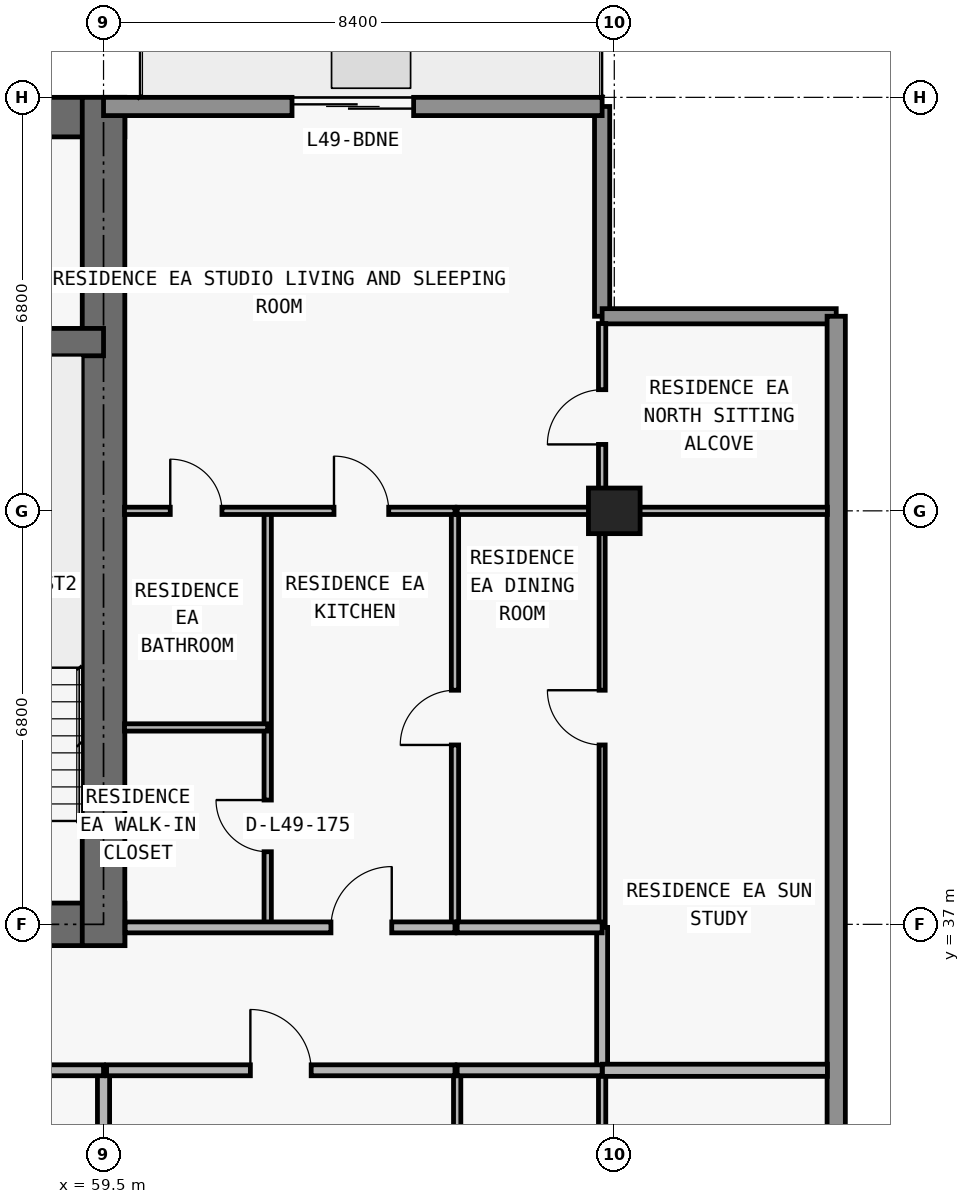
"""IFC4 building model, lengths in metres.
Left out: names, types, materials, properties, quantities, classifications, styles, units other than length and angle.
Written with IfcOpenShell. Run it as: python <this file> out.ifc"""

import sys

from ifc_helpers import new_model, si_unit, direction, frame, frame_2d, origin, origin_2d, place, context, subcontext, project, spatial, rectangle, extrude, element, fill, save


model = new_model("IFC4")
c1 = context("Model", 3, precision=1e-05, world=origin(), true_north=direction((0.0, 1.0)))
c2 = subcontext(c1, "Body", "Model", "MODEL_VIEW")
j1 = project(units=[si_unit("LENGTHUNIT", "METRE"), si_unit("PLANEANGLEUNIT", "RADIAN")], contexts=[c1])
p1 = place(None, origin())
s1 = spatial("IfcSite", under=j1, at=p1, CompositionType="ELEMENT")
p2 = place(p1, origin())
s2 = spatial("IfcBuilding", under=s1, at=p2, CompositionType="ELEMENT")
p3 = place(p2, frame((0.0, 0.0, 177.0)))
s3 = spatial("IfcBuildingStorey", under=s2, at=p3, CompositionType="ELEMENT", Elevation=177.0)
p4 = place(p3, frame((67.9, 43.8, 0.0), z_axis=(0.0, 0.0, 1.0), x_axis=(1.0, 0.0, 0.0)))
e1 = element("IfcColumn", 1, at=p4, inside=s3, PredefinedType="COLUMN", context=c2, shape_type="SweptSolid", body=[
    extrude(rectangle(XDim=0.85, YDim=0.75, at=origin_2d()), origin(), (0.0, 0.0, 1.0), 3.05),
])
p5 = place(p3, frame((17.95, 37.0, 0.0), z_axis=(0.0, 0.0, 1.0), x_axis=(1.0, 0.0, 0.0)))
e2 = element("IfcWall", 2, at=p5, inside=s3, PredefinedType="SHEAR", context=c2, shape_type="SweptSolid", body=[
    extrude(rectangle(XDim=41.9, YDim=0.7, at=frame_2d((20.95, 0.0))), origin(), (0.0, 0.0, 1.0), 3.05),
])
p6 = place(p5, frame((14.35, 0.0, 0.0)))
e3 = element("IfcOpeningElement", 3, at=p6, cuts=e2, PredefinedType="OPENING", context=c2, shape_type="SweptSolid", body=[
    extrude(rectangle(XDim=1.1, YDim=2.15, at=frame_2d((0.55, 1.075))), frame((0.0, 0.36, 0.0), z_axis=(0.0, -1.0, 0.0), x_axis=(1.0, 0.0, 0.0)), (0.0, 0.0, 1.0), 0.72),
])
p7 = place(p5, frame((6.2, 0.0, 0.0)))
e4 = element("IfcOpeningElement", 4, at=p7, cuts=e2, PredefinedType="OPENING", context=c2, shape_type="SweptSolid", body=[
    extrude(rectangle(XDim=1.05, YDim=2.15, at=frame_2d((0.525, 1.075))), frame((0.0, 0.36, 0.0), z_axis=(0.0, -1.0, 0.0), x_axis=(1.0, 0.0, 0.0)), (0.0, 0.0, 1.0), 0.72),
])
p8 = place(p5, frame((34.7, 0.0, 0.0)))
e5 = element("IfcOpeningElement", 5, at=p8, cuts=e2, PredefinedType="OPENING", context=c2, shape_type="SweptSolid", body=[
    extrude(rectangle(XDim=1.05, YDim=2.15, at=frame_2d((0.525, 1.075))), frame((0.0, 0.36, 0.0), z_axis=(0.0, -1.0, 0.0), x_axis=(1.0, 0.0, 0.0)), (0.0, 0.0, 1.0), 0.72),
])
p9 = place(p5, frame((10.812, 0.0, 0.0)))
e6 = element("IfcOpeningElement", 6, at=p9, cuts=e2, PredefinedType="OPENING", context=c2, shape_type="SweptSolid", body=[
    extrude(rectangle(XDim=1.05, YDim=2.15, at=frame_2d((0.525, 1.075))), frame((0.0, 0.36, 0.0), z_axis=(0.0, -1.0, 0.0), x_axis=(1.0, 0.0, 0.0)), (0.0, 0.0, 1.0), 0.72),
])
p10 = place(p5, frame((24.05, 0.0, 0.0)))
e7 = element("IfcOpeningElement", 7, at=p10, cuts=e2, PredefinedType="OPENING", context=c2, shape_type="SweptSolid", body=[
    extrude(rectangle(XDim=1.05, YDim=2.15, at=frame_2d((0.525, 1.075))), frame((0.0, 0.36, 0.0), z_axis=(0.0, -1.0, 0.0), x_axis=(1.0, 0.0, 0.0)), (0.0, 0.0, 1.0), 0.72),
])
p11 = place(p3, frame((17.95, 50.275, 0.0), z_axis=(0.0, 0.0, 1.0), x_axis=(1.0, 0.0, 0.0)))
e8 = element("IfcWall", 8, at=p11, inside=s3, PredefinedType="SHEAR", context=c2, shape_type="SweptSolid", body=[
    extrude(rectangle(XDim=41.9, YDim=0.65, at=frame_2d((20.95, 0.0))), origin(), (0.0, 0.0, 1.0), 3.05),
])
p12 = place(p3, frame((59.5, 36.65, 0.0), z_axis=(0.0, 0.0, 1.0), x_axis=(0.0, 1.0, 0.0)))
e9 = element("IfcWall", 9, at=p12, inside=s3, PredefinedType="SHEAR", context=c2, shape_type="SweptSolid", body=[
    extrude(rectangle(XDim=13.95, YDim=0.7, at=frame_2d((6.975, 0.0))), origin(), (0.0, 0.0, 1.0), 3.05),
])
p13 = place(p3, frame((18.3, 46.575, 0.0), z_axis=(0.0, 0.0, 1.0), x_axis=(1.0, 0.0, 0.0)))
e10 = element("IfcWall", 10, at=p13, inside=s3, PredefinedType="SHEAR", context=c2, shape_type="SweptSolid", body=[
    extrude(rectangle(XDim=41.2, YDim=0.45, at=frame_2d((20.6, 0.0))), origin(), (0.0, 0.0, 1.0), 3.05),
])
p14 = place(p13, frame((7.575, 0.0, 0.0)))
e11 = element("IfcOpeningElement", 11, at=p14, cuts=e10, PredefinedType="OPENING", context=c2, shape_type="SweptSolid", body=[
    extrude(rectangle(XDim=1.05, YDim=2.15, at=frame_2d((0.525, 1.075))), frame((0.0, 0.235, 0.0), z_axis=(0.0, -1.0, 0.0), x_axis=(1.0, 0.0, 0.0)), (0.0, 0.0, 1.0), 0.47),
])
p15 = place(p13, frame((32.625, 0.0, 0.0)))
e12 = element("IfcOpeningElement", 12, at=p15, cuts=e10, PredefinedType="OPENING", context=c2, shape_type="SweptSolid", body=[
    extrude(rectangle(XDim=1.05, YDim=2.15, at=frame_2d((0.525, 1.075))), frame((0.0, 0.235, 0.0), z_axis=(0.0, -1.0, 0.0), x_axis=(1.0, 0.0, 0.0)), (0.0, 0.0, 1.0), 0.47),
])
p16 = place(p3, frame((67.7, 50.45, 0.0), z_axis=(0.0, 0.0, 1.0), x_axis=(0.0, -1.0, 0.0)))
e13 = element("IfcWall", 13, at=p16, inside=s3, PredefinedType="ELEMENTEDWALL", context=c2, shape_type="SweptSolid", body=[
    extrude(rectangle(XDim=3.45, YDim=0.25, at=frame_2d((1.725, 0.0))), origin(), (0.0, 0.0, 1.0), 3.05),
])
p17 = place(p3, frame((67.7, 47.0, 0.0), z_axis=(0.0, 0.0, 1.0), x_axis=(1.0, 0.0, 0.0)))
e14 = element("IfcWall", 14, at=p17, inside=s3, PredefinedType="ELEMENTEDWALL", context=c2, shape_type="SweptSolid", body=[
    extrude(rectangle(XDim=3.85, YDim=0.25, at=frame_2d((1.925, 0.0))), origin(), (0.0, 0.0, 1.0), 3.05),
])
p18 = place(p3, frame((71.55, 47.0, 0.0), z_axis=(0.0, 0.0, 1.0), x_axis=(0.0, -1.0, 0.0)))
e15 = element("IfcWall", 15, at=p18, inside=s3, PredefinedType="STANDARD", context=c2, shape_type="SweptSolid", body=[
    extrude(rectangle(XDim=17.9, YDim=0.3, at=frame_2d((8.95, 0.0))), origin(), (0.0, 0.0, 1.0), 3.05),
])
p19 = place(p3, frame((59.5, 50.45, 0.0), z_axis=(0.0, 0.0, 1.0), x_axis=(1.0, 0.0, 0.0)))
e16 = element("IfcWall", 16, at=p19, inside=s3, PredefinedType="STANDARD", context=c2, shape_type="SweptSolid", body=[
    extrude(rectangle(XDim=8.2, YDim=0.3, at=frame_2d((4.1, 0.0))), origin(), (0.0, 0.0, 1.0), 3.05),
])
p20 = place(p19, frame((3.1, 0.0, 0.0)))
e17 = element("IfcOpeningElement", 17, at=p20, cuts=e16, PredefinedType="OPENING", context=c2, shape_type="SweptSolid", body=[
    extrude(rectangle(XDim=2.0, YDim=2.3, at=frame_2d((1.0, 1.15))), frame((0.0, 0.16, 0.0), z_axis=(0.0, -1.0, 0.0), x_axis=(1.0, 0.0, 0.0)), (0.0, 0.0, 1.0), 0.32),
])
p21 = place(p3, frame((59.5, 30.34, 0.0), z_axis=(0.0, 0.0, 1.0), x_axis=(0.0, 1.0, 0.0)))
e18 = element("IfcWall", 18, at=p21, inside=s3, PredefinedType="PARTITIONING", context=c2, shape_type="SweptSolid", body=[
    extrude(rectangle(XDim=4.26, YDim=0.2, at=frame_2d((2.13, 0.0))), origin(), (0.0, 0.0, 1.0), 2.263),
])
p22 = place(p3, frame((62.2, 37.0, 0.0), z_axis=(0.0, 0.0, 1.0), x_axis=(0.0, 1.0, 0.0)))
e19 = element("IfcWall", 19, at=p22, inside=s3, PredefinedType="PARTITIONING", context=c2, shape_type="SweptSolid", body=[
    extrude(rectangle(XDim=6.8, YDim=0.12, at=frame_2d((3.4, 0.0))), origin(), (0.0, 0.0, 1.0), 3.05),
])
p23 = place(p22, frame((1.194, 0.0, 0.0)))
e20 = element("IfcOpeningElement", 20, at=p23, cuts=e19, PredefinedType="OPENING", context=c2, shape_type="SweptSolid", body=[
    extrude(rectangle(XDim=0.85, YDim=2.1, at=frame_2d((0.425, 1.05))), frame((0.0, 0.07, 0.0), z_axis=(0.0, -1.0, 0.0), x_axis=(1.0, 0.0, 0.0)), (0.0, 0.0, 1.0), 0.14),
])
p24 = place(p3, frame((65.28, 37.0, 0.0), z_axis=(0.0, 0.0, 1.0), x_axis=(0.0, 1.0, 0.0)))
e21 = element("IfcWall", 21, at=p24, inside=s3, PredefinedType="PARTITIONING", context=c2, shape_type="SweptSolid", body=[
    extrude(rectangle(XDim=6.8, YDim=0.12, at=frame_2d((3.4, 0.0))), origin(), (0.0, 0.0, 1.0), 3.05),
])
p25 = place(p24, frame((2.95, 0.0, 0.0)))
e22 = element("IfcOpeningElement", 22, at=p25, cuts=e21, PredefinedType="OPENING", context=c2, shape_type="SweptSolid", body=[
    extrude(rectangle(XDim=0.9, YDim=2.15, at=frame_2d((0.45, 1.075))), frame((0.0, 0.07, 0.0), z_axis=(0.0, -1.0, 0.0), x_axis=(1.0, 0.0, 0.0)), (0.0, 0.0, 1.0), 0.14),
])
p26 = place(p3, frame((65.316, 30.34, 0.0), z_axis=(0.0, 0.0, 1.0), x_axis=(0.0, 1.0, 0.0)))
e23 = element("IfcWall", 23, at=p26, inside=s3, PredefinedType="PARTITIONING", context=c2, shape_type="SweptSolid", body=[
    extrude(rectangle(XDim=4.26, YDim=0.12, at=frame_2d((2.13, 0.0))), origin(), (0.0, 0.0, 1.0), 3.05),
])
p27 = place(p26, frame((1.705, 0.0, 0.0)))
e24 = element("IfcOpeningElement", 24, at=p27, cuts=e23, PredefinedType="OPENING", context=c2, shape_type="SweptSolid", body=[
    extrude(rectangle(XDim=0.85, YDim=2.1, at=frame_2d((0.425, 1.05))), frame((0.0, 0.07, 0.0), z_axis=(0.0, -1.0, 0.0), x_axis=(1.0, 0.0, 0.0)), (0.0, 0.0, 1.0), 0.14),
])
p28 = place(p3, frame((67.7, 30.34, 0.0), z_axis=(0.0, 0.0, 1.0), x_axis=(0.0, 1.0, 0.0)))
e25 = element("IfcWall", 25, at=p28, inside=s3, PredefinedType="PARTITIONING", context=c2, shape_type="SweptSolid", body=[
    extrude(rectangle(XDim=4.26, YDim=0.12, at=frame_2d((2.13, 0.0))), origin(), (0.0, 0.0, 1.0), 2.263),
])
p29 = place(p3, frame((67.7, 34.605, 0.0), z_axis=(0.0, 0.0, 1.0), x_axis=(0.0, 1.0, 0.0)))
e26 = element("IfcWall", 26, at=p29, inside=s3, PredefinedType="PARTITIONING", context=c2, shape_type="SweptSolid", body=[
    extrude(rectangle(XDim=2.345, YDim=0.18, at=frame_2d((1.172, 0.0))), origin(), (0.0, 0.0, 1.0), 2.263),
])
p30 = place(p3, frame((67.7, 37.0, 0.0), z_axis=(0.0, 0.0, 1.0), x_axis=(0.0, 1.0, 0.0)))
e27 = element("IfcWall", 27, at=p30, inside=s3, PredefinedType="MOVABLE", context=c2, shape_type="SweptSolid", body=[
    extrude(rectangle(XDim=6.8, YDim=0.1, at=frame_2d((3.4, 0.0))), origin(), (0.0, 0.0, 1.0), 2.263),
])
p31 = place(p30, frame((2.95, 0.0, 0.0)))
e28 = element("IfcOpeningElement", 28, at=p31, cuts=e27, PredefinedType="OPENING", context=c2, shape_type="SweptSolid", body=[
    extrude(rectangle(XDim=0.9, YDim=2.15, at=frame_2d((0.45, 1.075))), frame((0.0, 0.06, 0.0), z_axis=(0.0, -1.0, 0.0), x_axis=(1.0, 0.0, 0.0)), (0.0, 0.0, 1.0), 0.12),
])
p32 = place(p3, frame((67.7, 43.805, 0.0), z_axis=(0.0, 0.0, 1.0), x_axis=(0.0, 1.0, 0.0)))
e29 = element("IfcWall", 29, at=p32, inside=s3, PredefinedType="PARTITIONING", context=c2, shape_type="SweptSolid", body=[
    extrude(rectangle(XDim=3.075, YDim=0.12, at=frame_2d((1.538, 0.0))), origin(), (0.0, 0.0, 1.0), 3.05),
])
p33 = place(p32, frame((1.087, 0.0, 0.0)))
e30 = element("IfcOpeningElement", 30, at=p33, cuts=e29, PredefinedType="OPENING", context=c2, shape_type="SweptSolid", body=[
    extrude(rectangle(XDim=0.9, YDim=2.15, at=frame_2d((0.45, 1.075))), frame((0.0, 0.07, 0.0), z_axis=(0.0, -1.0, 0.0), x_axis=(1.0, 0.0, 0.0)), (0.0, 0.0, 1.0), 0.14),
])
p34 = place(p3, frame((18.3, 34.6, 0.0), z_axis=(0.0, 0.0, 1.0), x_axis=(1.0, 0.0, 0.0)))
e31 = element("IfcWall", 31, at=p34, inside=s3, PredefinedType="PARTITIONING", context=c2, shape_type="SweptSolid", body=[
    extrude(rectangle(XDim=41.2, YDim=0.18, at=frame_2d((20.6, 0.0))), origin(), (0.0, 0.0, 1.0), 3.05),
])
p35 = place(p34, frame((2.67, 0.0, 0.0)))
e32 = element("IfcOpeningElement", 32, at=p35, cuts=e31, PredefinedType="OPENING", context=c2, shape_type="SweptSolid", body=[
    extrude(rectangle(XDim=1.0, YDim=2.2, at=frame_2d((0.5, 1.1))), frame((0.0, 0.1, 0.0), z_axis=(0.0, -1.0, 0.0), x_axis=(1.0, 0.0, 0.0)), (0.0, 0.0, 1.0), 0.2),
])
p36 = place(p34, frame((11.212, 0.0, 0.0)))
e33 = element("IfcOpeningElement", 33, at=p36, cuts=e31, PredefinedType="OPENING", context=c2, shape_type="SweptSolid", body=[
    extrude(rectangle(XDim=1.0, YDim=2.2, at=frame_2d((0.5, 1.1))), frame((0.0, 0.1, 0.0), z_axis=(0.0, -1.0, 0.0), x_axis=(1.0, 0.0, 0.0)), (0.0, 0.0, 1.0), 0.2),
])
p37 = place(p34, frame((35.483, 0.0, 0.0)))
e34 = element("IfcOpeningElement", 34, at=p37, cuts=e31, PredefinedType="OPENING", context=c2, shape_type="SweptSolid", body=[
    extrude(rectangle(XDim=1.0, YDim=2.2, at=frame_2d((0.5, 1.1))), frame((0.0, 0.1, 0.0), z_axis=(0.0, -1.0, 0.0), x_axis=(1.0, 0.0, 0.0)), (0.0, 0.0, 1.0), 0.2),
])
p38 = place(p3, frame((59.55, 34.6, 0.0), z_axis=(0.0, 0.0, 1.0), x_axis=(1.0, 0.0, 0.0)))
e35 = element("IfcWall", 35, at=p38, inside=s3, PredefinedType="PARTITIONING", context=c2, shape_type="SweptSolid", body=[
    extrude(rectangle(XDim=5.73, YDim=0.18, at=frame_2d((2.865, 0.0))), origin(), (0.0, 0.0, 1.0), 3.05),
])
p39 = place(p38, frame((2.365, 0.0, 0.0)))
e36 = element("IfcOpeningElement", 36, at=p39, cuts=e35, PredefinedType="OPENING", context=c2, shape_type="SweptSolid", body=[
    extrude(rectangle(XDim=1.0, YDim=2.2, at=frame_2d((0.5, 1.1))), frame((0.0, 0.1, 0.0), z_axis=(0.0, -1.0, 0.0), x_axis=(1.0, 0.0, 0.0)), (0.0, 0.0, 1.0), 0.2),
])
p40 = place(p3, frame((65.316, 34.6, 0.0), z_axis=(0.0, 0.0, 1.0), x_axis=(1.0, 0.0, 0.0)))
e37 = element("IfcWall", 37, at=p40, inside=s3, PredefinedType="PARTITIONING", context=c2, shape_type="SweptSolid", body=[
    extrude(rectangle(XDim=2.384, YDim=0.18, at=frame_2d((1.192, 0.0))), origin(), (0.0, 0.0, 1.0), 3.05),
])
p41 = place(p3, frame((67.705, 34.6, 0.0), z_axis=(0.0, 0.0, 1.0), x_axis=(1.0, 0.0, 0.0)))
e38 = element("IfcWall", 38, at=p41, inside=s3, PredefinedType="PARTITIONING", context=c2, shape_type="SweptSolid", body=[
    extrude(rectangle(XDim=3.7, YDim=0.2, at=frame_2d((1.85, 0.0))), origin(), (0.0, 0.0, 1.0), 3.05),
])
p42 = place(p3, frame((59.855, 36.95, 0.0), z_axis=(0.0, 0.0, 1.0), x_axis=(1.0, 0.0, 0.0)))
e39 = element("IfcWall", 39, at=p42, inside=s3, PredefinedType="PARTITIONING", context=c2, shape_type="SweptSolid", body=[
    extrude(rectangle(XDim=5.425, YDim=0.18, at=frame_2d((2.712, 0.0))), origin(), (0.0, 0.0, 1.0), 3.05),
])
p43 = place(p42, frame((3.385, 0.0, 0.0)))
e40 = element("IfcOpeningElement", 40, at=p43, cuts=e39, PredefinedType="OPENING", context=c2, shape_type="SweptSolid", body=[
    extrude(rectangle(XDim=1.0, YDim=2.2, at=frame_2d((0.5, 1.1))), frame((0.0, 0.1, 0.0), z_axis=(0.0, -1.0, 0.0), x_axis=(1.0, 0.0, 0.0)), (0.0, 0.0, 1.0), 0.2),
])
p44 = place(p3, frame((65.316, 36.95, 0.0), z_axis=(0.0, 0.0, 1.0), x_axis=(1.0, 0.0, 0.0)))
e41 = element("IfcWall", 41, at=p44, inside=s3, PredefinedType="PARTITIONING", context=c2, shape_type="SweptSolid", body=[
    extrude(rectangle(XDim=2.384, YDim=0.18, at=frame_2d((1.192, 0.0))), origin(), (0.0, 0.0, 1.0), 3.05),
])
p45 = place(p3, frame((59.845, 40.238, 0.0), z_axis=(0.0, 0.0, 1.0), x_axis=(1.0, 0.0, 0.0)))
e42 = element("IfcWall", 42, at=p45, inside=s3, PredefinedType="PARTITIONING", context=c2, shape_type="SweptSolid", body=[
    extrude(rectangle(XDim=2.355, YDim=0.12, at=frame_2d((1.177, 0.0))), origin(), (0.0, 0.0, 1.0), 3.05),
])
p46 = place(p3, frame((59.845, 43.8, 0.0), z_axis=(0.0, 0.0, 1.0), x_axis=(1.0, 0.0, 0.0)))
e43 = element("IfcWall", 43, at=p46, inside=s3, PredefinedType="PARTITIONING", context=c2, shape_type="SweptSolid", body=[
    extrude(rectangle(XDim=5.435, YDim=0.12, at=frame_2d((2.718, 0.0))), origin(), (0.0, 0.0, 1.0), 2.418),
])
p47 = place(p46, frame((3.445, 0.0, 0.0)))
e44 = element("IfcOpeningElement", 44, at=p47, cuts=e43, PredefinedType="OPENING", context=c2, shape_type="SweptSolid", body=[
    extrude(rectangle(XDim=0.9, YDim=2.15, at=frame_2d((0.45, 1.075))), frame((0.0, 0.07, 0.0), z_axis=(0.0, -1.0, 0.0), x_axis=(1.0, 0.0, 0.0)), (0.0, 0.0, 1.0), 0.14),
])
p48 = place(p46, frame((0.752, 0.0, 0.0)))
e45 = element("IfcOpeningElement", 45, at=p48, cuts=e43, PredefinedType="OPENING", context=c2, shape_type="SweptSolid", body=[
    extrude(rectangle(XDim=0.85, YDim=2.1, at=frame_2d((0.425, 1.05))), frame((0.0, 0.07, 0.0), z_axis=(0.0, -1.0, 0.0), x_axis=(1.0, 0.0, 0.0)), (0.0, 0.0, 1.0), 0.14),
])
p49 = place(p3, frame((65.316, 43.8, 0.0), z_axis=(0.0, 0.0, 1.0), x_axis=(1.0, 0.0, 0.0)))
e46 = element("IfcWall", 46, at=p49, inside=s3, PredefinedType="PARTITIONING", context=c2, shape_type="SweptSolid", body=[
    extrude(rectangle(XDim=6.089, YDim=0.12, at=frame_2d((3.044, 0.0))), origin(), (0.0, 0.0, 1.0), 2.418),
])
p50 = place(p20, origin())
e47 = element("IfcDoor", 47, at=p50, inside=s3, OperationType="DOUBLE_DOOR_SLIDING", PredefinedType="DOOR", context=c2, shape_type="SweptSolid", body=[
    extrude(rectangle(XDim=2.0, YDim=2.3, at=frame_2d((1.0, 1.15))), frame((0.0, 0.025, 0.0), z_axis=(0.0, -1.0, 0.0), x_axis=(1.0, 0.0, 0.0)), (0.0, 0.0, 1.0), 0.05),
])
fill(e17, e47)
p51 = place(p39, origin())
e48 = element("IfcDoor", 48, at=p51, inside=s3, OperationType="SINGLE_SWING_LEFT", PredefinedType="DOOR", context=c2, shape_type="SweptSolid", body=[
    extrude(rectangle(XDim=1.0, YDim=2.2, at=frame_2d((0.5, 1.1))), frame((0.0, 0.025, 0.0), z_axis=(0.0, -1.0, 0.0), x_axis=(1.0, 0.0, 0.0)), (0.0, 0.0, 1.0), 0.05),
])
fill(e36, e48)
p52 = place(p25, origin())
e49 = element("IfcDoor", 49, at=p52, inside=s3, OperationType="SINGLE_SWING_LEFT", PredefinedType="DOOR", context=c2, shape_type="SweptSolid", body=[
    extrude(rectangle(XDim=0.9, YDim=2.15, at=frame_2d((0.45, 1.075))), frame((0.0, 0.025, 0.0), z_axis=(0.0, -1.0, 0.0), x_axis=(1.0, 0.0, 0.0)), (0.0, 0.0, 1.0), 0.05),
])
fill(e22, e49)
p53 = place(p43, origin())
e50 = element("IfcDoor", 50, at=p53, inside=s3, OperationType="SINGLE_SWING_RIGHT", PredefinedType="DOOR", context=c2, shape_type="SweptSolid", body=[
    extrude(rectangle(XDim=1.0, YDim=2.2, at=frame_2d((0.5, 1.1))), frame((0.0, 0.025, 0.0), z_axis=(0.0, -1.0, 0.0), x_axis=(1.0, 0.0, 0.0)), (0.0, 0.0, 1.0), 0.05),
])
fill(e40, e50)
p54 = place(p47, origin())
e51 = element("IfcDoor", 51, at=p54, inside=s3, OperationType="SINGLE_SWING_LEFT", PredefinedType="DOOR", context=c2, shape_type="SweptSolid", body=[
    extrude(rectangle(XDim=0.9, YDim=2.15, at=frame_2d((0.45, 1.075))), frame((0.0, 0.025, 0.0), z_axis=(0.0, -1.0, 0.0), x_axis=(1.0, 0.0, 0.0)), (0.0, 0.0, 1.0), 0.05),
])
fill(e44, e51)
p55 = place(p23, origin())
e52 = element("IfcDoor", 52, at=p55, inside=s3, OperationType="SINGLE_SWING_RIGHT", PredefinedType="DOOR", context=c2, shape_type="SweptSolid", body=[
    extrude(rectangle(XDim=0.85, YDim=2.1, at=frame_2d((0.425, 1.05))), frame((0.0, 0.025, 0.0), z_axis=(0.0, -1.0, 0.0), x_axis=(1.0, 0.0, 0.0)), (0.0, 0.0, 1.0), 0.05),
])
fill(e20, e52)
p56 = place(p48, origin())
e53 = element("IfcDoor", 53, at=p56, inside=s3, OperationType="SINGLE_SWING_LEFT", PredefinedType="DOOR", context=c2, shape_type="SweptSolid", body=[
    extrude(rectangle(XDim=0.85, YDim=2.1, at=frame_2d((0.425, 1.05))), frame((0.0, 0.025, 0.0), z_axis=(0.0, -1.0, 0.0), x_axis=(1.0, 0.0, 0.0)), (0.0, 0.0, 1.0), 0.05),
])
fill(e45, e53)
p57 = place(p31, origin())
e54 = element("IfcDoor", 54, at=p57, inside=s3, OperationType="SINGLE_SWING_RIGHT", PredefinedType="DOOR", context=c2, shape_type="SweptSolid", body=[
    extrude(rectangle(XDim=0.9, YDim=2.15, at=frame_2d((0.45, 1.075))), frame((0.0, 0.025, 0.0), z_axis=(0.0, -1.0, 0.0), x_axis=(1.0, 0.0, 0.0)), (0.0, 0.0, 1.0), 0.05),
])
fill(e28, e54)
p58 = place(p33, origin())
e55 = element("IfcDoor", 55, at=p58, inside=s3, OperationType="SINGLE_SWING_LEFT", PredefinedType="DOOR", context=c2, shape_type="SweptSolid", body=[
    extrude(rectangle(XDim=0.9, YDim=2.15, at=frame_2d((0.45, 1.075))), frame((0.0, 0.025, 0.0), z_axis=(0.0, -1.0, 0.0), x_axis=(1.0, 0.0, 0.0)), (0.0, 0.0, 1.0), 0.05),
])
fill(e30, e55)
save(model, sys.argv[1])
